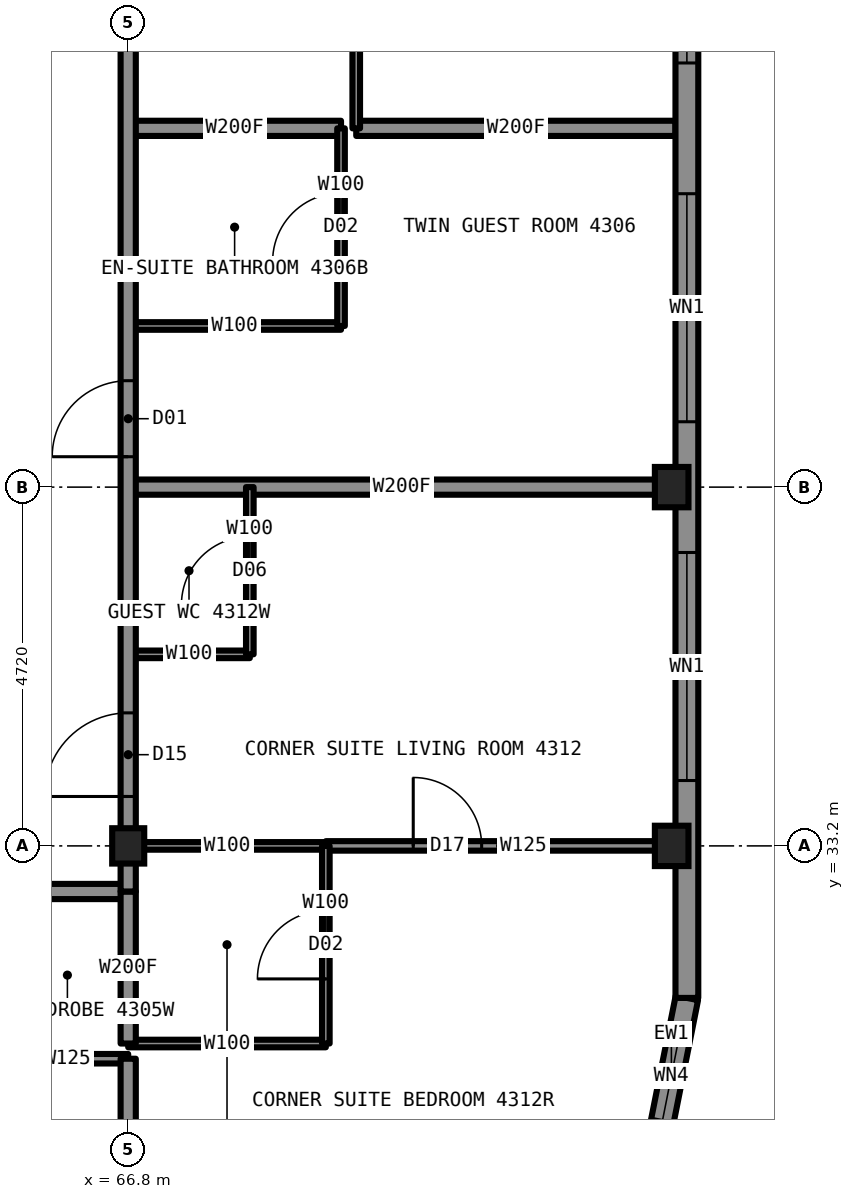
"""IFC4 building model, lengths in metres.
Left out: names, types, materials, properties, quantities, classifications, styles, units other than length and angle.
Written with IfcOpenShell. Run it as: python <this file> out.ifc"""

import sys

from ifc_helpers import new_model, si_unit, direction, frame, frame_2d, origin, origin_2d, place, context, subcontext, project, spatial, rectangle, i_section, extrude, element, fill, save


model = new_model("IFC4")
c1 = context("Model", 3, precision=1e-05, world=origin(), true_north=direction((0.0, 1.0)))
c2 = subcontext(c1, "Body", "Model", "MODEL_VIEW")
j1 = project(units=[si_unit("LENGTHUNIT", "METRE"), si_unit("PLANEANGLEUNIT", "RADIAN")], contexts=[c1])
p1 = place(None, origin())
s1 = spatial("IfcSite", under=j1, at=p1, CompositionType="ELEMENT")
p2 = place(p1, origin())
s2 = spatial("IfcBuilding", under=s1, at=p2, CompositionType="ELEMENT")
p3 = place(p2, frame((0.0, 0.0, 161.8)))
s3 = spatial("IfcBuildingStorey", under=s2, at=p3, CompositionType="ELEMENT", Elevation=161.8)
for number, where, z_axis, x_axis in (
    (1, (73.95, 33.2, 0.0), (0.0, 0.0, 1.0), (1.0, 0.0, 0.0)),
    (2, (73.95, 37.92, 0.0), (0.0, 0.0, 1.0), (1.0, 0.0, 0.0)),
):
    element("IfcColumn", number, at=place(p3, frame(where, z_axis=z_axis, x_axis=x_axis)), inside=s3, PredefinedType="COLUMN", context=c2, shape_type="SweptSolid", body=[
        extrude(i_section(OverallWidth=0.442, OverallDepth=0.531, WebThickness=0.066, FlangeThickness=0.106, at=origin_2d()), origin(), (0.0, 0.0, 1.0), 3.5),
    ])
p4 = place(p3, frame((66.8, 33.2, 0.0), z_axis=(0.0, 0.0, 1.0), x_axis=(1.0, 0.0, 0.0)))
e3 = element("IfcColumn", 3, at=p4, inside=s3, PredefinedType="COLUMN", context=c2, shape_type="SweptSolid", body=[
    extrude(i_section(OverallWidth=0.422, OverallDepth=0.465, WebThickness=0.045, FlangeThickness=0.073, at=origin_2d()), origin(), (0.0, 0.0, 1.0), 3.5),
])
p5 = place(p3, frame((66.8, 33.2, 0.0), z_axis=(0.0, 0.0, 1.0), x_axis=(1.0, 0.0, 0.0)))
e4 = element("IfcWall", 4, at=p5, inside=s3, PredefinedType="PARTITIONING", context=c2, shape_type="SweptSolid", body=[
    extrude(rectangle(XDim=2.6, YDim=0.1, at=frame_2d((1.3, 0.0))), origin(), (0.0, 0.0, 1.0), 2.573),
])
p6 = place(p3, frame((69.4, 33.2, 0.0), z_axis=(0.0, 0.0, 1.0), x_axis=(1.0, 0.0, 0.0)))
e5 = element("IfcWall", 5, at=p6, inside=s3, PredefinedType="PARTITIONING", context=c2, shape_type="SweptSolid", body=[
    extrude(rectangle(XDim=4.6, YDim=0.125, at=frame_2d((2.3, 0.0))), origin(), (0.0, 0.0, 1.0), 2.573),
])
p7 = place(p6, frame((1.15, 0.0, 0.0)))
e6 = element("IfcOpeningElement", 6, at=p7, cuts=e5, PredefinedType="OPENING", context=c2, shape_type="SweptSolid", body=[
    extrude(rectangle(XDim=0.9, YDim=2.2, at=frame_2d((0.45, 1.1))), frame((0.0, 0.073, 0.0), z_axis=(0.0, -1.0, 0.0), x_axis=(1.0, 0.0, 0.0)), (0.0, 0.0, 1.0), 0.145),
])
p8 = place(p3, frame((43.2, 32.6, 0.0), z_axis=(0.0, 0.0, 1.0), x_axis=(1.0, 0.0, 0.0)))
e7 = element("IfcWall", 7, at=p8, inside=s3, PredefinedType="PARTITIONING", context=c2, shape_type="SweptSolid", body=[
    extrude(rectangle(XDim=23.6, YDim=0.2, at=frame_2d((11.8, 0.0))), origin(), (0.0, 0.0, 1.0), 3.33),
])
p9 = place(p8, frame((3.0, 0.0, 0.0)))
e8 = element("IfcOpeningElement", 8, at=p9, cuts=e7, PredefinedType="OPENING", context=c2, shape_type="SweptSolid", body=[
    extrude(rectangle(XDim=1.0, YDim=2.2, at=frame_2d((0.5, 1.1))), frame((0.0, 0.11, 0.0), z_axis=(0.0, -1.0, 0.0), x_axis=(1.0, 0.0, 0.0)), (0.0, 0.0, 1.0), 0.22),
])
p10 = place(p8, frame((11.7, 0.0, 0.0)))
e9 = element("IfcOpeningElement", 9, at=p10, cuts=e7, PredefinedType="OPENING", context=c2, shape_type="SweptSolid", body=[
    extrude(rectangle(XDim=1.0, YDim=2.2, at=frame_2d((0.5, 1.1))), frame((0.0, 0.11, 0.0), z_axis=(0.0, -1.0, 0.0), x_axis=(1.0, 0.0, 0.0)), (0.0, 0.0, 1.0), 0.22),
])
p11 = place(p8, frame((17.16, 0.0, 0.0)))
e10 = element("IfcOpeningElement", 10, at=p11, cuts=e7, PredefinedType="OPENING", context=c2, shape_type="SweptSolid", body=[
    extrude(rectangle(XDim=1.0, YDim=2.2, at=frame_2d((0.5, 1.1))), frame((0.0, 0.11, 0.0), z_axis=(0.0, -1.0, 0.0), x_axis=(1.0, 0.0, 0.0)), (0.0, 0.0, 1.0), 0.22),
])
p12 = place(p3, frame((66.8, 30.6, 0.0), z_axis=(0.0, 0.0, 1.0), x_axis=(1.0, 0.0, 0.0)))
e11 = element("IfcWall", 11, at=p12, inside=s3, PredefinedType="PARTITIONING", context=c2, shape_type="SweptSolid", body=[
    extrude(rectangle(XDim=2.6, YDim=0.1, at=frame_2d((1.3, 0.0))), origin(), (0.0, 0.0, 1.0), 3.33),
])
p13 = place(p3, frame((65.2, 30.4, 0.0), z_axis=(0.0, 0.0, 1.0), x_axis=(1.0, 0.0, 0.0)))
e12 = element("IfcWall", 12, at=p13, inside=s3, PredefinedType="PARTITIONING", context=c2, shape_type="SweptSolid", body=[
    extrude(rectangle(XDim=1.6, YDim=0.125, at=frame_2d((0.8, 0.0))), origin(), (0.0, 0.0, 1.0), 3.33),
])
p14 = place(p3, frame((66.8, 42.64, 0.0), z_axis=(0.0, 0.0, 1.0), x_axis=(1.0, 0.0, 0.0)))
e13 = element("IfcWall", 13, at=p14, inside=s3, PredefinedType="PARTITIONING", context=c2, shape_type="SweptSolid", body=[
    extrude(rectangle(XDim=2.8, YDim=0.2, at=frame_2d((1.4, 0.0))), origin(), (0.0, 0.0, 1.0), 2.73),
])
p15 = place(p3, frame((69.8, 42.64, 0.0), z_axis=(0.0, 0.0, 1.0), x_axis=(1.0, 0.0, 0.0)))
e14 = element("IfcWall", 14, at=p15, inside=s3, PredefinedType="PARTITIONING", context=c2, shape_type="SweptSolid", body=[
    extrude(rectangle(XDim=4.2, YDim=0.2, at=frame_2d((2.1, 0.0))), origin(), (0.0, 0.0, 1.0), 2.73),
])
p16 = place(p3, frame((66.8, 40.04, 0.0), z_axis=(0.0, 0.0, 1.0), x_axis=(1.0, 0.0, 0.0)))
e15 = element("IfcWall", 15, at=p16, inside=s3, PredefinedType="PARTITIONING", context=c2, shape_type="SweptSolid", body=[
    extrude(rectangle(XDim=2.8, YDim=0.1, at=frame_2d((1.4, 0.0))), origin(), (0.0, 0.0, 1.0), 3.33),
])
p17 = place(p3, frame((66.8, 37.92, 0.0), z_axis=(0.0, 0.0, 1.0), x_axis=(1.0, 0.0, 0.0)))
e16 = element("IfcWall", 16, at=p17, inside=s3, PredefinedType="PARTITIONING", context=c2, shape_type="SweptSolid", body=[
    extrude(rectangle(XDim=7.2, YDim=0.2, at=frame_2d((3.6, 0.0))), origin(), (0.0, 0.0, 1.0), 2.573),
])
p18 = place(p3, frame((66.8, 35.72, 0.0), z_axis=(0.0, 0.0, 1.0), x_axis=(1.0, 0.0, 0.0)))
e17 = element("IfcWall", 17, at=p18, inside=s3, PredefinedType="PARTITIONING", context=c2, shape_type="SweptSolid", body=[
    extrude(rectangle(XDim=1.6, YDim=0.1, at=frame_2d((0.8, 0.0))), origin(), (0.0, 0.0, 1.0), 3.33),
])
p19 = place(p3, frame((66.8, 33.22, 0.0), z_axis=(0.0, 0.0, 1.0), x_axis=(0.0, 1.0, 0.0)))
e18 = element("IfcWall", 18, at=p19, inside=s3, PredefinedType="PARTITIONING", context=c2, shape_type="SweptSolid", body=[
    extrude(rectangle(XDim=23.56, YDim=0.2, at=frame_2d((11.78, 0.0))), origin(), (0.0, 0.0, 1.0), 3.33),
])
p20 = place(p19, frame((5.1, 0.0, 0.0)))
e19 = element("IfcOpeningElement", 19, at=p20, cuts=e18, PredefinedType="OPENING", context=c2, shape_type="SweptSolid", body=[
    extrude(rectangle(XDim=1.0, YDim=2.2, at=frame_2d((0.5, 1.1))), frame((0.0, 0.11, 0.0), z_axis=(0.0, -1.0, 0.0), x_axis=(1.0, 0.0, 0.0)), (0.0, 0.0, 1.0), 0.22),
])
p21 = place(p19, frame((12.42, 0.0, 0.0)))
e20 = element("IfcOpeningElement", 20, at=p21, cuts=e18, PredefinedType="OPENING", context=c2, shape_type="SweptSolid", body=[
    extrude(rectangle(XDim=1.0, YDim=2.2, at=frame_2d((0.5, 1.1))), frame((0.0, 0.11, 0.0), z_axis=(0.0, -1.0, 0.0), x_axis=(1.0, 0.0, 0.0)), (0.0, 0.0, 1.0), 0.22),
])
p22 = place(p19, frame((22.03, 0.0, 0.0)))
e21 = element("IfcOpeningElement", 21, at=p22, cuts=e18, PredefinedType="OPENING", context=c2, shape_type="SweptSolid", body=[
    extrude(rectangle(XDim=1.1, YDim=2.2, at=frame_2d((0.55, 1.1))), frame((0.0, 0.11, 0.0), z_axis=(0.0, -1.0, 0.0), x_axis=(1.0, 0.0, 0.0)), (0.0, 0.0, 1.0), 0.22),
])
p23 = place(p19, frame((0.63, 0.0, 0.0)))
e22 = element("IfcOpeningElement", 22, at=p23, cuts=e18, PredefinedType="OPENING", context=c2, shape_type="SweptSolid", body=[
    extrude(rectangle(XDim=1.1, YDim=2.2, at=frame_2d((0.55, 1.1))), frame((0.0, 0.11, 0.0), z_axis=(0.0, -1.0, 0.0), x_axis=(1.0, 0.0, 0.0)), (0.0, 0.0, 1.0), 0.22),
])
p24 = place(p3, frame((66.8, 26.0, 0.0), z_axis=(0.0, 0.0, 1.0), x_axis=(0.0, 1.0, 0.0)))
e23 = element("IfcWall", 23, at=p24, inside=s3, PredefinedType="PARTITIONING", context=c2, shape_type="SweptSolid", body=[
    extrude(rectangle(XDim=4.4, YDim=0.2, at=frame_2d((2.2, 0.0))), origin(), (0.0, 0.0, 1.0), 2.573),
])
p25 = place(p3, frame((66.8, 30.6, 0.0), z_axis=(0.0, 0.0, 1.0), x_axis=(0.0, 1.0, 0.0)))
e24 = element("IfcWall", 24, at=p25, inside=s3, PredefinedType="PARTITIONING", context=c2, shape_type="SweptSolid", body=[
    extrude(rectangle(XDim=2.0, YDim=0.2, at=frame_2d((1.0, 0.0))), origin(), (0.0, 0.0, 1.0), 2.573),
])
p26 = place(p3, frame((68.4, 35.72, 0.0), z_axis=(0.0, 0.0, 1.0), x_axis=(0.0, 1.0, 0.0)))
e25 = element("IfcWall", 25, at=p26, inside=s3, PredefinedType="PARTITIONING", context=c2, shape_type="SweptSolid", body=[
    extrude(rectangle(XDim=2.2, YDim=0.1, at=frame_2d((1.1, 0.0))), origin(), (0.0, 0.0, 1.0), 3.33),
])
p27 = place(p26, frame((0.65, 0.0, 0.0)))
e26 = element("IfcOpeningElement", 26, at=p27, cuts=e25, PredefinedType="OPENING", context=c2, shape_type="SweptSolid", body=[
    extrude(rectangle(XDim=0.9, YDim=2.1, at=frame_2d((0.45, 1.05))), frame((0.0, 0.06, 0.0), z_axis=(0.0, -1.0, 0.0), x_axis=(1.0, 0.0, 0.0)), (0.0, 0.0, 1.0), 0.12),
])
p28 = place(p3, frame((69.4, 30.6, 0.0), z_axis=(0.0, 0.0, 1.0), x_axis=(0.0, 1.0, 0.0)))
e27 = element("IfcWall", 27, at=p28, inside=s3, PredefinedType="PARTITIONING", context=c2, shape_type="SweptSolid", body=[
    extrude(rectangle(XDim=2.6, YDim=0.1, at=frame_2d((1.3, 0.0))), origin(), (0.0, 0.0, 1.0), 3.33),
])
p29 = place(p28, frame((0.85, 0.0, 0.0)))
e28 = element("IfcOpeningElement", 28, at=p29, cuts=e27, PredefinedType="OPENING", context=c2, shape_type="SweptSolid", body=[
    extrude(rectangle(XDim=0.9, YDim=2.1, at=frame_2d((0.45, 1.05))), frame((0.0, 0.06, 0.0), z_axis=(0.0, -1.0, 0.0), x_axis=(1.0, 0.0, 0.0)), (0.0, 0.0, 1.0), 0.12),
])
p30 = place(p3, frame((69.6, 40.04, 0.0), z_axis=(0.0, 0.0, 1.0), x_axis=(0.0, 1.0, 0.0)))
e29 = element("IfcWall", 29, at=p30, inside=s3, PredefinedType="PARTITIONING", context=c2, shape_type="SweptSolid", body=[
    extrude(rectangle(XDim=2.6, YDim=0.1, at=frame_2d((1.3, 0.0))), origin(), (0.0, 0.0, 1.0), 3.33),
])
p31 = place(p30, frame((0.85, 0.0, 0.0)))
e30 = element("IfcOpeningElement", 30, at=p31, cuts=e29, PredefinedType="OPENING", context=c2, shape_type="SweptSolid", body=[
    extrude(rectangle(XDim=0.9, YDim=2.1, at=frame_2d((0.45, 1.05))), frame((0.0, 0.06, 0.0), z_axis=(0.0, -1.0, 0.0), x_axis=(1.0, 0.0, 0.0)), (0.0, 0.0, 1.0), 0.12),
])
p32 = place(p3, frame((69.8, 42.64, 0.0), z_axis=(0.0, 0.0, 1.0), x_axis=(0.0, 1.0, 0.0)))
e31 = element("IfcWall", 31, at=p32, inside=s3, PredefinedType="PARTITIONING", context=c2, shape_type="SweptSolid", body=[
    extrude(rectangle(XDim=2.6, YDim=0.1, at=frame_2d((1.3, 0.0))), origin(), (0.0, 0.0, 1.0), 3.33),
])
p33 = place(p3, frame((73.743, 29.153, 0.0), z_axis=(0.0, 0.0, 1.0), x_axis=(0.195081421501, 0.980787050784, 0.0)))
e32 = element("IfcWall", 32, at=p33, inside=s3, PredefinedType="SOLIDWALL", context=c2, shape_type="SweptSolid", body=[
    extrude(rectangle(XDim=2.087, YDim=0.3, at=frame_2d((1.044, 0.0))), origin(), (0.0, 0.0, 1.0), 3.33),
])
p34 = place(p33, frame((0.444, 0.0, 0.3)))
e33 = element("IfcOpeningElement", 33, at=p34, cuts=e32, PredefinedType="OPENING", context=c2, shape_type="SweptSolid", body=[
    extrude(rectangle(XDim=1.2, YDim=2.0, at=frame_2d((0.6, 1.0))), frame((0.0, 0.16, 0.0), z_axis=(0.0, -1.0, 0.0), x_axis=(1.0, 0.0, 0.0)), (0.0, 0.0, 1.0), 0.32),
])
p35 = place(p3, frame((74.15, 31.2, 0.0), z_axis=(0.0, 0.0, 1.0), x_axis=(0.0, 1.0, 0.0)))
e34 = element("IfcWall", 34, at=p35, inside=s3, PredefinedType="SOLIDWALL", context=c2, shape_type="SweptSolid", body=[
    extrude(rectangle(XDim=27.6, YDim=0.3, at=frame_2d((13.8, 0.0))), origin(), (0.0, 0.0, 1.0), 2.83),
])
p36 = place(p35, frame((2.86, 0.0, 0.3)))
e35 = element("IfcOpeningElement", 35, at=p36, cuts=e34, PredefinedType="OPENING", context=c2, shape_type="SweptSolid", body=[
    extrude(rectangle(XDim=3.0, YDim=2.0, at=frame_2d((1.5, 1.0))), frame((0.0, 0.16, 0.0), z_axis=(0.0, -1.0, 0.0), x_axis=(1.0, 0.0, 0.0)), (0.0, 0.0, 1.0), 0.32),
])
p37 = place(p35, frame((7.58, 0.0, 0.3)))
e36 = element("IfcOpeningElement", 36, at=p37, cuts=e34, PredefinedType="OPENING", context=c2, shape_type="SweptSolid", body=[
    extrude(rectangle(XDim=3.0, YDim=2.0, at=frame_2d((1.5, 1.0))), frame((0.0, 0.16, 0.0), z_axis=(0.0, -1.0, 0.0), x_axis=(1.0, 0.0, 0.0)), (0.0, 0.0, 1.0), 0.32),
])
p38 = place(p35, frame((12.3, 0.0, 0.3)))
e37 = element("IfcOpeningElement", 37, at=p38, cuts=e34, PredefinedType="OPENING", context=c2, shape_type="SweptSolid", body=[
    extrude(rectangle(XDim=3.0, YDim=2.0, at=frame_2d((1.5, 1.0))), frame((0.0, 0.16, 0.0), z_axis=(0.0, -1.0, 0.0), x_axis=(1.0, 0.0, 0.0)), (0.0, 0.0, 1.0), 0.32),
])
p39 = place(p35, frame((17.02, 0.0, 0.3)))
e38 = element("IfcOpeningElement", 38, at=p39, cuts=e34, PredefinedType="OPENING", context=c2, shape_type="SweptSolid", body=[
    extrude(rectangle(XDim=3.0, YDim=2.0, at=frame_2d((1.5, 1.0))), frame((0.0, 0.16, 0.0), z_axis=(0.0, -1.0, 0.0), x_axis=(1.0, 0.0, 0.0)), (0.0, 0.0, 1.0), 0.32),
])
p40 = place(p35, frame((21.74, 0.0, 0.3)))
e39 = element("IfcOpeningElement", 39, at=p40, cuts=e34, PredefinedType="OPENING", context=c2, shape_type="SweptSolid", body=[
    extrude(rectangle(XDim=3.0, YDim=2.0, at=frame_2d((1.5, 1.0))), frame((0.0, 0.16, 0.0), z_axis=(0.0, -1.0, 0.0), x_axis=(1.0, 0.0, 0.0)), (0.0, 0.0, 1.0), 0.32),
])
p41 = place(p3, frame((66.8, 32.6, 0.0), z_axis=(0.0, 0.0, 1.0), x_axis=(0.0, 1.0, 0.0)))
e40 = element("IfcWall", 40, at=p41, inside=s3, PredefinedType="PARTITIONING", context=c2, shape_type="SweptSolid", body=[
    extrude(rectangle(XDim=0.62, YDim=0.2, at=frame_2d((0.31, 0.0))), origin(), (0.0, 0.0, 1.0), 2.573),
])
p42 = place(p20, origin())
e41 = element("IfcDoor", 41, at=p42, inside=s3, OperationType="SINGLE_SWING_LEFT", PredefinedType="DOOR", context=c2, shape_type="SweptSolid", body=[
    extrude(rectangle(XDim=1.0, YDim=2.2, at=frame_2d((0.5, 1.1))), frame((0.0, 0.025, 0.0), z_axis=(0.0, -1.0, 0.0), x_axis=(1.0, 0.0, 0.0)), (0.0, 0.0, 1.0), 0.05),
])
fill(e19, e41)
p43 = place(p31, origin())
e42 = element("IfcDoor", 42, at=p43, inside=s3, OperationType="SINGLE_SWING_RIGHT", PredefinedType="DOOR", context=c2, shape_type="SweptSolid", body=[
    extrude(rectangle(XDim=0.9, YDim=2.1, at=frame_2d((0.45, 1.05))), frame((0.0, 0.025, 0.0), z_axis=(0.0, -1.0, 0.0), x_axis=(1.0, 0.0, 0.0)), (0.0, 0.0, 1.0), 0.05),
])
fill(e30, e42)
p44 = place(p23, origin())
e43 = element("IfcDoor", 43, at=p44, inside=s3, OperationType="SINGLE_SWING_LEFT", PredefinedType="DOOR", context=c2, shape_type="SweptSolid", body=[
    extrude(rectangle(XDim=1.1, YDim=2.2, at=frame_2d((0.55, 1.1))), frame((0.0, 0.025, 0.0), z_axis=(0.0, -1.0, 0.0), x_axis=(1.0, 0.0, 0.0)), (0.0, 0.0, 1.0), 0.05),
])
fill(e22, e43)
p45 = place(p29, origin())
e44 = element("IfcDoor", 44, at=p45, inside=s3, OperationType="SINGLE_SWING_RIGHT", PredefinedType="DOOR", context=c2, shape_type="SweptSolid", body=[
    extrude(rectangle(XDim=0.9, YDim=2.1, at=frame_2d((0.45, 1.05))), frame((0.0, 0.025, 0.0), z_axis=(0.0, -1.0, 0.0), x_axis=(1.0, 0.0, 0.0)), (0.0, 0.0, 1.0), 0.05),
])
fill(e28, e44)
p46 = place(p7, origin())
e45 = element("IfcDoor", 45, at=p46, inside=s3, OperationType="SINGLE_SWING_LEFT", PredefinedType="DOOR", context=c2, shape_type="SweptSolid", body=[
    extrude(rectangle(XDim=0.9, YDim=2.2, at=frame_2d((0.45, 1.1))), frame((0.0, 0.025, 0.0), z_axis=(0.0, -1.0, 0.0), x_axis=(1.0, 0.0, 0.0)), (0.0, 0.0, 1.0), 0.05),
])
fill(e6, e45)
p47 = place(p27, origin())
e46 = element("IfcDoor", 46, at=p47, inside=s3, OperationType="SINGLE_SWING_LEFT", PredefinedType="DOOR", context=c2, shape_type="SweptSolid", body=[
    extrude(rectangle(XDim=0.9, YDim=2.1, at=frame_2d((0.45, 1.05))), frame((0.0, 0.025, 0.0), z_axis=(0.0, -1.0, 0.0), x_axis=(1.0, 0.0, 0.0)), (0.0, 0.0, 1.0), 0.05),
])
fill(e26, e46)
p48 = place(p34, origin())
e47 = element("IfcWindow", 47, at=p48, inside=s3, PartitioningType="SINGLE_PANEL", PredefinedType="WINDOW", context=c2, shape_type="SweptSolid", body=[
    extrude(rectangle(XDim=1.2, YDim=2.0, at=frame_2d((0.6, 1.0))), frame((0.0, 0.13, 0.0), z_axis=(0.0, -1.0, 0.0), x_axis=(1.0, 0.0, 0.0)), (0.0, 0.0, 1.0), 0.06),
])
fill(e33, e47)
p49 = place(p36, origin())
e48 = element("IfcWindow", 48, at=p49, inside=s3, PartitioningType="SINGLE_PANEL", PredefinedType="WINDOW", context=c2, shape_type="SweptSolid", body=[
    extrude(rectangle(XDim=3.0, YDim=2.0, at=frame_2d((1.5, 1.0))), frame((0.0, 0.13, 0.0), z_axis=(0.0, -1.0, 0.0), x_axis=(1.0, 0.0, 0.0)), (0.0, 0.0, 1.0), 0.06),
])
fill(e35, e48)
p50 = place(p37, origin())
e49 = element("IfcWindow", 49, at=p50, inside=s3, PartitioningType="SINGLE_PANEL", PredefinedType="WINDOW", context=c2, shape_type="SweptSolid", body=[
    extrude(rectangle(XDim=3.0, YDim=2.0, at=frame_2d((1.5, 1.0))), frame((0.0, 0.13, 0.0), z_axis=(0.0, -1.0, 0.0), x_axis=(1.0, 0.0, 0.0)), (0.0, 0.0, 1.0), 0.06),
])
fill(e36, e49)
p51 = place(p38, origin())
e50 = element("IfcWindow", 50, at=p51, inside=s3, PartitioningType="SINGLE_PANEL", PredefinedType="WINDOW", context=c2, shape_type="SweptSolid", body=[
    extrude(rectangle(XDim=3.0, YDim=2.0, at=frame_2d((1.5, 1.0))), frame((0.0, 0.13, 0.0), z_axis=(0.0, -1.0, 0.0), x_axis=(1.0, 0.0, 0.0)), (0.0, 0.0, 1.0), 0.06),
])
fill(e37, e50)
save(model, sys.argv[1])
